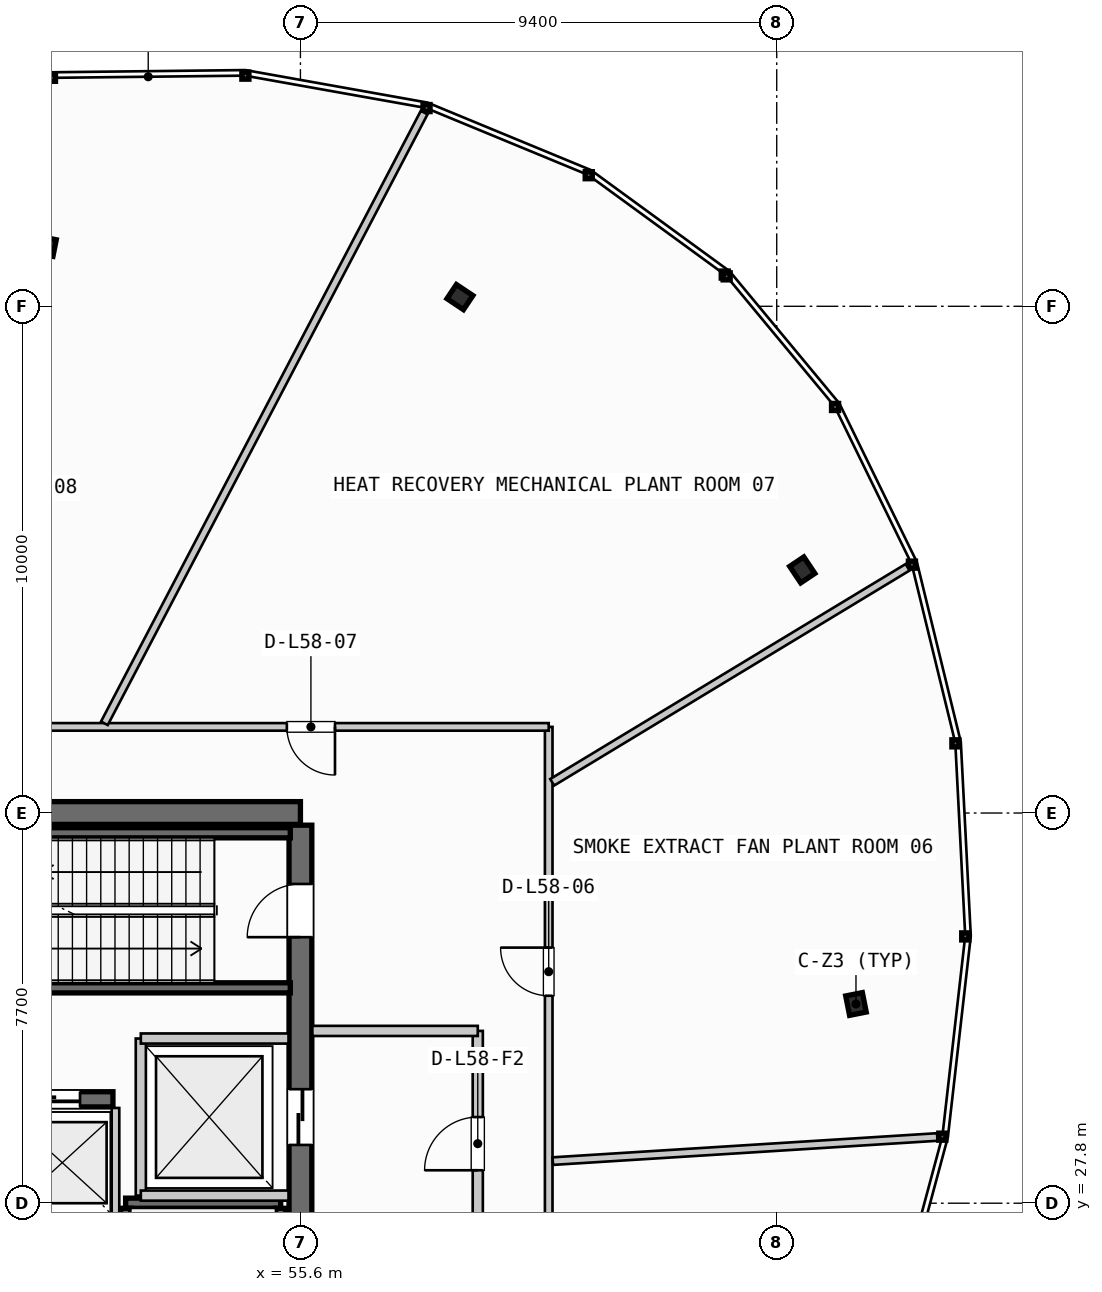
"""IFC4 building model, lengths in metres.
Left out: names, types, materials, properties, quantities, classifications, styles, units other than length and angle.
Written with IfcOpenShell. Run it as: python <this file> out.ifc"""

import sys

from ifc_helpers import new_model, si_unit, direction, frame, frame_2d, origin, origin_2d, place, context, subcontext, project, spatial, rectangle, i_section, extrude, source, transform, mapped, element, fill, save


model = new_model("IFC4")
c1 = context("Model", 3, precision=1e-05, world=origin(), true_north=direction((0.0, 1.0)))
c2 = subcontext(c1, "Body", "Model", "MODEL_VIEW")
j1 = project(units=[si_unit("LENGTHUNIT", "METRE"), si_unit("PLANEANGLEUNIT", "RADIAN")], contexts=[c1])
p1 = place(None, origin())
s1 = spatial("IfcSite", under=j1, at=p1, CompositionType="ELEMENT")
p2 = place(p1, origin())
s2 = spatial("IfcBuilding", under=s1, at=p2, CompositionType="ELEMENT")
p3 = place(p2, frame((0.0, 0.0, 223.6)))
s3 = spatial("IfcBuildingStorey", under=s2, at=p3, CompositionType="ELEMENT", Elevation=223.6)
p4 = place(p3, frame((55.6, 35.5, 0.0), z_axis=(0.0, 0.0, 1.0), x_axis=(-1.0, 0.0, 0.0)))
e1 = element("IfcWall", 1, at=p4, inside=s3, PredefinedType="SHEAR", context=c2, shape_type="SweptSolid", body=[
    extrude(rectangle(XDim=17.6, YDim=0.45, at=frame_2d((8.8, 0.0))), origin(), (0.0, 0.0, 1.0), 4.38),
])
p5 = place(p4, frame((8.05, 0.0, 0.0)))
e2 = element("IfcOpeningElement", 2, at=p5, cuts=e1, PredefinedType="OPENING", context=c2, shape_type="SweptSolid", body=[
    extrude(rectangle(XDim=1.5, YDim=2.2, at=frame_2d((0.75, 1.1))), frame((0.0, 0.235, 0.0), z_axis=(0.0, -1.0, 0.0), x_axis=(1.0, 0.0, 0.0)), (0.0, 0.0, 1.0), 0.47),
])
p6 = place(p4, frame((15.1, 0.0, 0.0)))
e3 = element("IfcOpeningElement", 3, at=p6, cuts=e1, PredefinedType="OPENING", context=c2, shape_type="SweptSolid", body=[
    extrude(rectangle(XDim=0.95, YDim=2.15, at=frame_2d((0.475, 1.075))), frame((0.0, 0.235, 0.0), z_axis=(0.0, -1.0, 0.0), x_axis=(1.0, 0.0, 0.0)), (0.0, 0.0, 1.0), 0.47),
])
p7 = place(p4, frame((12.6, 0.0, 0.0)))
e4 = element("IfcOpeningElement", 4, at=p7, cuts=e1, PredefinedType="OPENING", context=c2, shape_type="SweptSolid", body=[
    extrude(rectangle(XDim=0.95, YDim=2.15, at=frame_2d((0.475, 1.075))), frame((0.0, 0.235, 0.0), z_axis=(0.0, -1.0, 0.0), x_axis=(1.0, 0.0, 0.0)), (0.0, 0.0, 1.0), 0.47),
])
p8 = place(p4, frame((10.45, 0.0, 0.0)))
e5 = element("IfcOpeningElement", 5, at=p8, cuts=e1, PredefinedType="OPENING", context=c2, shape_type="SweptSolid", body=[
    extrude(rectangle(XDim=0.95, YDim=2.15, at=frame_2d((0.475, 1.075))), frame((0.0, 0.235, 0.0), z_axis=(0.0, -1.0, 0.0), x_axis=(1.0, 0.0, 0.0)), (0.0, 0.0, 1.0), 0.47),
])
p9 = place(p3, frame((55.6, 20.34, 0.0), z_axis=(0.0, 0.0, 1.0), x_axis=(0.0, 1.0, 0.0)))
e6 = element("IfcWall", 6, at=p9, inside=s3, PredefinedType="SHEAR", context=c2, shape_type="SweptSolid", body=[
    extrude(rectangle(XDim=14.92, YDim=0.45, at=frame_2d((7.46, 0.0))), origin(), (0.0, 0.0, 1.0), 4.38),
])
p10 = place(p9, frame((12.71, 0.0, 0.0)))
e7 = element("IfcOpeningElement", 7, at=p10, cuts=e6, PredefinedType="OPENING", context=c2, shape_type="SweptSolid", body=[
    extrude(rectangle(XDim=1.05, YDim=2.15, at=frame_2d((0.525, 1.075))), frame((0.0, 0.235, 0.0), z_axis=(0.0, -1.0, 0.0), x_axis=(1.0, 0.0, 0.0)), (0.0, 0.0, 1.0), 0.47),
])
p11 = place(p9, frame((8.61, 0.0, 0.0)))
e8 = element("IfcOpeningElement", 8, at=p11, cuts=e6, PredefinedType="OPENING", context=c2, shape_type="SweptSolid", body=[
    extrude(rectangle(XDim=1.1, YDim=2.2, at=frame_2d((0.55, 1.1))), frame((0.0, 0.235, 0.0), z_axis=(0.0, -1.0, 0.0), x_axis=(1.0, 0.0, 0.0)), (0.0, 0.0, 1.0), 0.47),
])
p12 = place(p3, frame((47.65, 29.85, 0.0), z_axis=(0.0, 0.0, 1.0), x_axis=(1.0, 0.0, 0.0)))
e9 = element("IfcWall", 9, at=p12, inside=s3, PredefinedType="SHEAR", context=c2, shape_type="SweptSolid", body=[
    extrude(rectangle(XDim=4.25, YDim=0.3, at=frame_2d((2.125, 0.0))), origin(), (0.0, 0.0, 1.0), 4.38),
])
p13 = place(p12, frame((0.45, 0.0, 0.0)))
e10 = element("IfcOpeningElement", 10, at=p13, cuts=e9, PredefinedType="OPENING", context=c2, shape_type="SweptSolid", body=[
    extrude(rectangle(XDim=1.1, YDim=2.2, at=frame_2d((0.55, 1.1))), frame((0.0, 0.16, 0.0), z_axis=(0.0, -1.0, 0.0), x_axis=(1.0, 0.0, 0.0)), (0.0, 0.0, 1.0), 0.32),
])
p14 = place(p12, frame((2.5, 0.0, 0.0)))
e11 = element("IfcOpeningElement", 11, at=p14, cuts=e9, PredefinedType="OPENING", context=c2, shape_type="SweptSolid", body=[
    extrude(rectangle(XDim=1.1, YDim=2.2, at=frame_2d((0.55, 1.1))), frame((0.0, 0.16, 0.0), z_axis=(0.0, -1.0, 0.0), x_axis=(1.0, 0.0, 0.0)), (0.0, 0.0, 1.0), 0.32),
])
m1 = source(origin(), c2, "Body", "SweptSolid", [
    extrude(i_section(OverallWidth=0.391, OverallDepth=0.335, WebThickness=0.023, FlangeThickness=0.034, FilletRadius=0.015, at=origin_2d()), origin(), (0.0, 0.0, 1.0), 4.38),
])
for number, where, z_axis, x_axis in (
    (12, (66.564, 31.731, 0.0), (0.0, 0.0, 1.0), (0.981, 0.195, 0.0)),
    (13, (65.504, 40.298, 0.0), (0.0, 0.0, 1.0), (0.831, 0.556, 0.0)),
    (14, (58.748, 45.681, 0.0), (0.0, 0.0, 1.0), (0.556, 0.831, 0.0)),
    (15, (50.557, 46.688, 0.0), (0.0, 0.0, 1.0), (0.195, 0.981, 0.0)),
):
    element("IfcColumn", number, at=place(p3, frame(where, z_axis=z_axis, x_axis=x_axis)), inside=s3, PredefinedType="COLUMN", context=c2, shape_type="MappedRepresentation", body=[
        mapped(m1, transform((0.0, 0.0, 0.0), scale=1.0)),
    ])
p15 = place(p3, frame((52.15, 27.8, 0.0), z_axis=(0.0, 0.0, 1.0), x_axis=(1.0, 0.0, 0.0)))
e16 = element("IfcWall", 16, at=p15, inside=s3, PredefinedType="SHEAR", context=c2, shape_type="SweptSolid", body=[
    extrude(rectangle(XDim=3.06, YDim=0.2, at=frame_2d((1.53, 0.0))), origin(), (0.0, 0.0, 1.0), 4.38),
])
for number, where, z_axis, x_axis in (
    (17, (55.21, 27.7, 0.0), (0.0, 0.0, 1.0), (0.0, -1.0, 0.0)),
    (18, (52.15, 20.35, 0.0), (0.0, 0.0, 1.0), (0.0, 1.0, 0.0)),
    (19, (48.05, 35.11, 0.0), (0.0, 0.0, 1.0), (1.0, 0.0, 0.0)),
    (20, (55.4, 32.05, 0.0), (0.0, 0.0, 1.0), (-1.0, 0.0, 0.0)),
):
    element("IfcWall", number, at=place(p3, frame(where, z_axis=z_axis, x_axis=x_axis)), inside=s3, PredefinedType="SHEAR", context=c2, shape_type="SweptSolid", body=[
        extrude(rectangle(XDim=7.35, YDim=0.2, at=frame_2d((3.675, 0.0))), origin(), (0.0, 0.0, 1.0), 4.38),
    ])
p16 = place(p3, frame((52.45, 27.95, 0.0), z_axis=(0.0, 0.0, 1.0), x_axis=(0.0, 1.0, 0.0)))
e21 = element("IfcWall", 21, at=p16, inside=s3, PredefinedType="PARTITIONING", context=c2, shape_type="SweptSolid", body=[
    extrude(rectangle(XDim=3.1, YDim=0.2, at=frame_2d((1.55, 0.0))), origin(), (0.0, 0.0, 1.0), 2.455),
])
for number, where, z_axis, x_axis in (
    (22, (52.45, 27.95, 0.0), (0.0, 0.0, 1.0), (1.0, 0.0, 0.0)),
    (23, (52.45, 31.05, 0.0), (0.0, 0.0, 1.0), (1.0, 0.0, 0.0)),
):
    element("IfcWall", number, at=place(p3, frame(where, z_axis=z_axis, x_axis=x_axis)), inside=s3, PredefinedType="PARTITIONING", context=c2, shape_type="SweptSolid", body=[
        extrude(rectangle(XDim=2.915, YDim=0.2, at=frame_2d((1.458, 0.0))), origin(), (0.0, 0.0, 1.0), 2.455),
    ])
p17 = place(p3, frame((59.1, 26.8, 0.0), z_axis=(0.0, 0.0, 1.0), x_axis=(0.0, 1.0, 0.0)))
e24 = element("IfcWall", 24, at=p17, inside=s3, PredefinedType="PARTITIONING", context=c2, shape_type="SweptSolid", body=[
    extrude(rectangle(XDim=4.4, YDim=0.2, at=frame_2d((2.2, 0.0))), origin(), (0.0, 0.0, 1.0), 2.455),
])
p18 = place(p17, frame((1.65, 0.0, 0.0)))
e25 = element("IfcOpeningElement", 25, at=p18, cuts=e24, PredefinedType="OPENING", context=c2, shape_type="SweptSolid", body=[
    extrude(rectangle(XDim=1.05, YDim=2.15, at=frame_2d((0.525, 1.075))), frame((0.0, 0.11, 0.0), z_axis=(0.0, -1.0, 0.0), x_axis=(1.0, 0.0, 0.0)), (0.0, 0.0, 1.0), 0.22),
])
p19 = place(p3, frame((55.835, 31.2, 0.0), z_axis=(0.0, 0.0, 1.0), x_axis=(1.0, 0.0, 0.0)))
e26 = element("IfcWall", 26, at=p19, inside=s3, PredefinedType="PARTITIONING", context=c2, shape_type="SweptSolid", body=[
    extrude(rectangle(XDim=3.265, YDim=0.2, at=frame_2d((1.633, 0.0))), origin(), (0.0, 0.0, 1.0), 2.455),
])
p20 = place(p3, frame((51.95, 27.34, 0.0), z_axis=(0.0, 0.0, 1.0), x_axis=(0.0, 1.0, 0.0)))
e27 = element("IfcWall", 27, at=p20, inside=s3, PredefinedType="PARTITIONING", context=c2, shape_type="SweptSolid", body=[
    extrude(rectangle(XDim=2.34, YDim=0.15, at=frame_2d((1.17, 0.0))), origin(), (0.0, 0.0, 1.0), 2.455),
])
p21 = place(p3, frame((60.5, 18.4, 0.0), z_axis=(0.0, 0.0, 1.0), x_axis=(0.0, 1.0, 0.0)))
e28 = element("IfcWall", 28, at=p21, inside=s3, PredefinedType="PARTITIONING", context=c2, shape_type="SweptSolid", body=[
    extrude(rectangle(XDim=18.8, YDim=0.15, at=frame_2d((9.4, 0.0))), origin(), (0.0, 0.0, 1.0), 2.455),
])
p22 = place(p21, frame((4.928, 0.0, 0.0)))
e29 = element("IfcOpeningElement", 29, at=p22, cuts=e28, PredefinedType="OPENING", context=c2, shape_type="SweptSolid", body=[
    extrude(rectangle(XDim=0.95, YDim=2.15, at=frame_2d((0.475, 1.075))), frame((0.0, 0.085, 0.0), z_axis=(0.0, -1.0, 0.0), x_axis=(1.0, 0.0, 0.0)), (0.0, 0.0, 1.0), 0.17),
])
p23 = place(p21, frame((13.494, 0.0, 0.0)))
e30 = element("IfcOpeningElement", 30, at=p23, cuts=e28, PredefinedType="OPENING", context=c2, shape_type="SweptSolid", body=[
    extrude(rectangle(XDim=0.95, YDim=2.15, at=frame_2d((0.475, 1.075))), frame((0.0, 0.085, 0.0), z_axis=(0.0, -1.0, 0.0), x_axis=(1.0, 0.0, 0.0)), (0.0, 0.0, 1.0), 0.17),
])
p24 = place(p3, frame((60.5, 37.2, 0.0), z_axis=(0.0, 0.0, 1.0), x_axis=(-1.0, 0.0, 0.0)))
e31 = element("IfcWall", 31, at=p24, inside=s3, PredefinedType="PARTITIONING", context=c2, shape_type="SweptSolid", body=[
    extrude(rectangle(XDim=27.4, YDim=0.15, at=frame_2d((13.7, 0.0))), origin(), (0.0, 0.0, 1.0), 2.455),
])
p25 = place(p24, frame((4.218, 0.0, 0.0)))
e32 = element("IfcOpeningElement", 32, at=p25, cuts=e31, PredefinedType="OPENING", context=c2, shape_type="SweptSolid", body=[
    extrude(rectangle(XDim=0.95, YDim=2.15, at=frame_2d((0.475, 1.075))), frame((0.0, 0.085, 0.0), z_axis=(0.0, -1.0, 0.0), x_axis=(1.0, 0.0, 0.0)), (0.0, 0.0, 1.0), 0.17),
])
p26 = place(p24, frame((12.726, 0.0, 0.0)))
e33 = element("IfcOpeningElement", 33, at=p26, cuts=e31, PredefinedType="OPENING", context=c2, shape_type="SweptSolid", body=[
    extrude(rectangle(XDim=0.95, YDim=2.15, at=frame_2d((0.475, 1.075))), frame((0.0, 0.085, 0.0), z_axis=(0.0, -1.0, 0.0), x_axis=(1.0, 0.0, 0.0)), (0.0, 0.0, 1.0), 0.17),
])
p27 = place(p24, frame((20.248, 0.0, 0.0)))
e34 = element("IfcOpeningElement", 34, at=p27, cuts=e31, PredefinedType="OPENING", context=c2, shape_type="SweptSolid", body=[
    extrude(rectangle(XDim=0.95, YDim=2.15, at=frame_2d((0.475, 1.075))), frame((0.0, 0.085, 0.0), z_axis=(0.0, -1.0, 0.0), x_axis=(1.0, 0.0, 0.0)), (0.0, 0.0, 1.0), 0.17),
])
p28 = place(p3, frame((60.58, 28.631, 0.0), z_axis=(0.0, 0.0, 1.0), x_axis=(0.998037933453, 0.062612166465, 0.0)))
e35 = element("IfcWall", 35, at=p28, inside=s3, PredefinedType="PARTITIONING", context=c2, shape_type="SweptSolid", body=[
    extrude(rectangle(XDim=7.604, YDim=0.15, at=frame_2d((3.802, 0.0))), origin(), (0.0, 0.0, 1.0), 2.455),
])
p29 = place(p3, frame((60.569, 36.107, 0.0), z_axis=(0.0, 0.0, 1.0), x_axis=(0.855642733501, 0.517566916067, 0.0)))
e36 = element("IfcWall", 36, at=p29, inside=s3, PredefinedType="PARTITIONING", context=c2, shape_type="SweptSolid", body=[
    extrude(rectangle(XDim=8.198, YDim=0.15, at=frame_2d((4.099, 0.0))), origin(), (0.0, 0.0, 1.0), 2.455),
])
p30 = place(p3, frame((51.731, 37.271, 0.0), z_axis=(0.0, 0.0, 1.0), x_axis=(0.46390305582, 0.885885971669, 0.0)))
e37 = element("IfcWall", 37, at=p30, inside=s3, PredefinedType="PARTITIONING", context=c2, shape_type="SweptSolid", body=[
    extrude(rectangle(XDim=13.605, YDim=0.15, at=frame_2d((6.802, 0.0))), origin(), (0.0, 0.0, 1.0), 2.455),
])
m2 = source(origin(), c2, "Body", "SweptSolid", [
    extrude(rectangle(XDim=1.05, YDim=2.15, at=frame_2d((0.525, 1.075))), frame((0.0, 0.025, 0.0), z_axis=(0.0, -1.0, 0.0), x_axis=(1.0, 0.0, 0.0)), (0.0, 0.0, 1.0), 0.05),
])
p31 = place(p10, origin())
e38 = element("IfcDoor", 38, at=p31, inside=s3, OperationType="SINGLE_SWING_LEFT", PredefinedType="DOOR", context=c2, shape_type="MappedRepresentation", body=[
    mapped(m2, transform((0.0, 0.0, 0.0), scale=1.0)),
])
fill(e7, e38)
m3 = source(origin(), c2, "Body", "SweptSolid", [
    extrude(rectangle(XDim=1.1, YDim=2.2, at=frame_2d((0.55, 1.1))), frame((0.0, 0.025, 0.0), z_axis=(0.0, -1.0, 0.0), x_axis=(1.0, 0.0, 0.0)), (0.0, 0.0, 1.0), 0.05),
])
p32 = place(p11, origin())
e39 = element("IfcDoor", 39, at=p32, inside=s3, OperationType="SLIDING_TO_RIGHT", PredefinedType="DOOR", context=c2, shape_type="MappedRepresentation", body=[
    mapped(m3, transform((0.0, 0.0, 0.0), scale=1.0)),
])
fill(e8, e39)
p33 = place(p14, origin())
e40 = element("IfcDoor", 40, at=p33, inside=s3, OperationType="SLIDING_TO_LEFT", PredefinedType="DOOR", context=c2, shape_type="MappedRepresentation", body=[
    mapped(m3, transform((0.0, 0.0, 0.0), scale=1.0)),
])
fill(e11, e40)
p34 = place(p18, origin())
e41 = element("IfcDoor", 41, at=p34, inside=s3, OperationType="SINGLE_SWING_LEFT", PredefinedType="DOOR", context=c2, shape_type="MappedRepresentation", body=[
    mapped(m2, transform((0.0, 0.0, 0.0), scale=1.0)),
])
fill(e25, e41)
m4 = source(origin(), c2, "Body", "SweptSolid", [
    extrude(rectangle(XDim=0.95, YDim=2.15, at=frame_2d((0.475, 1.075))), frame((0.0, 0.025, 0.0), z_axis=(0.0, -1.0, 0.0), x_axis=(1.0, 0.0, 0.0)), (0.0, 0.0, 1.0), 0.05),
])
p35 = place(p23, origin())
e42 = element("IfcDoor", 42, at=p35, inside=s3, OperationType="SINGLE_SWING_RIGHT", PredefinedType="DOOR", context=c2, shape_type="MappedRepresentation", body=[
    mapped(m4, transform((0.0, 0.0, 0.0), scale=1.0)),
])
fill(e30, e42)
p36 = place(p25, origin())
e43 = element("IfcDoor", 43, at=p36, inside=s3, OperationType="SINGLE_SWING_LEFT", PredefinedType="DOOR", context=c2, shape_type="MappedRepresentation", body=[
    mapped(m4, transform((0.0, 0.0, 0.0), scale=1.0)),
])
fill(e32, e43)
save(model, sys.argv[1])
